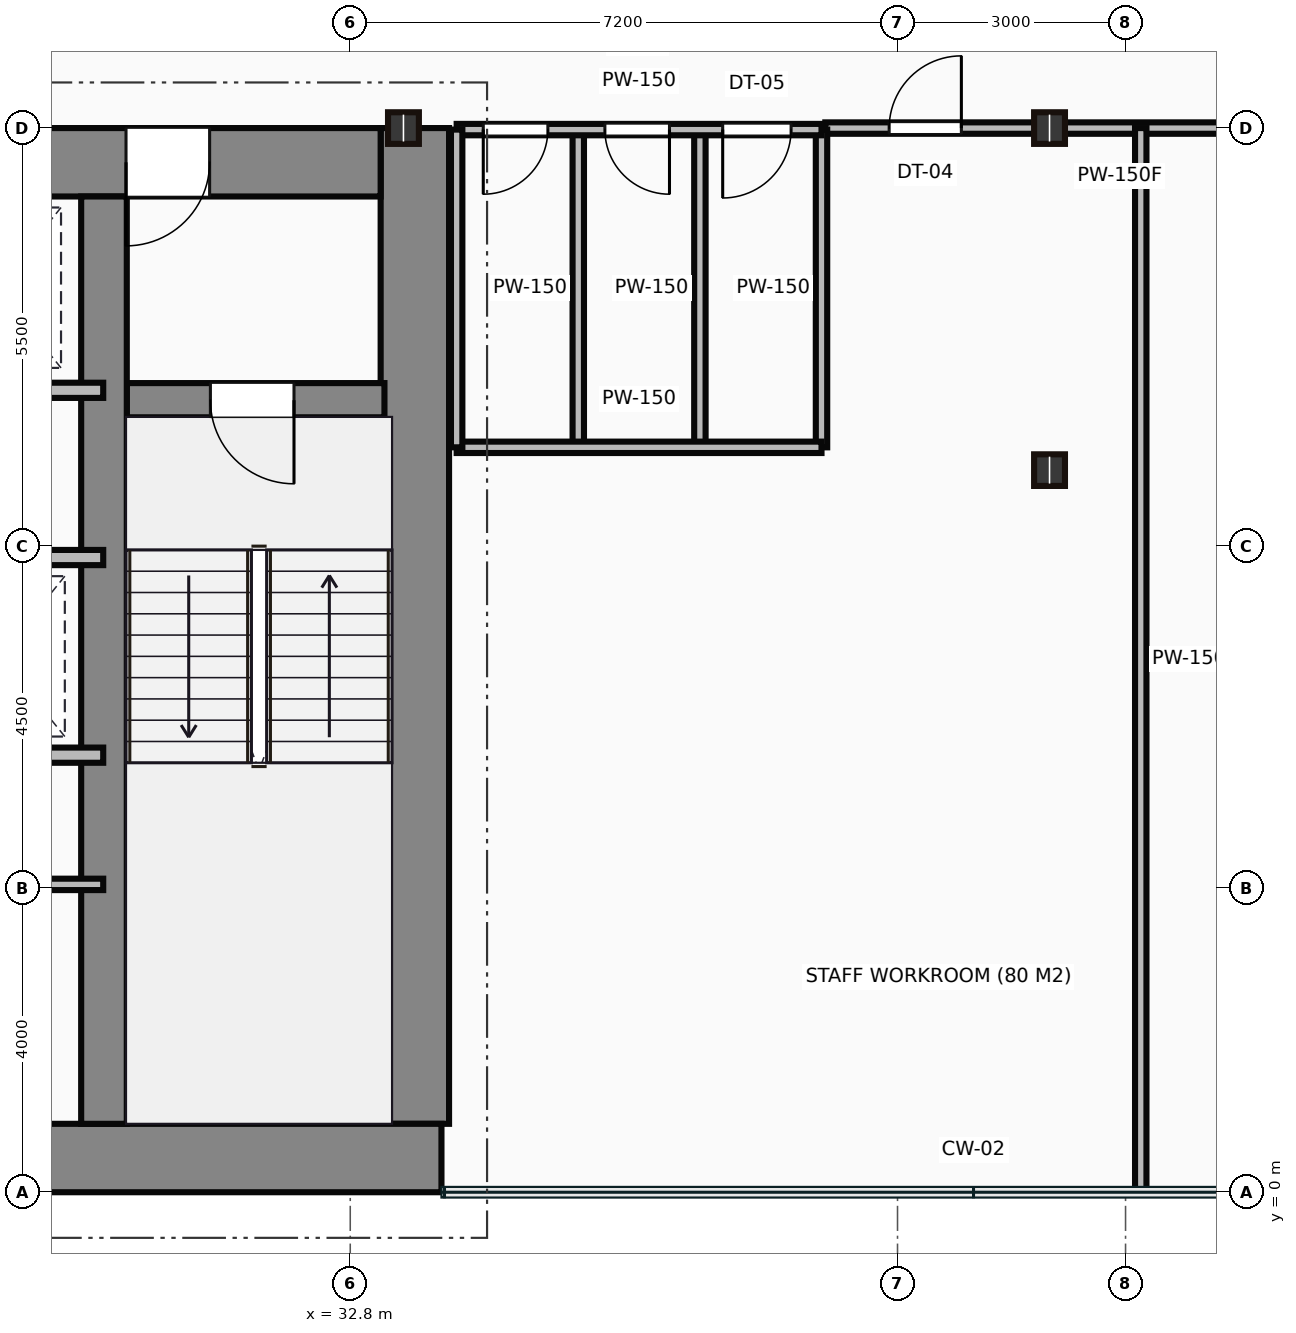
"""IFC4 building model, lengths in metres.
Left out: names, types, materials, properties, quantities, classifications, styles, units other than length and angle.
Written with IfcOpenShell. Run it as: python <this file> out.ifc"""

import sys

from ifc_helpers import new_model, si_unit, direction, frame, frame_2d, origin, origin_2d, place, context, subcontext, project, spatial, rectangle, i_section, extrude, source, transform, mapped, element, fill, save


model = new_model("IFC4")
c1 = context("Model", 3, precision=1e-05, world=origin(), true_north=direction((0.0, 1.0)))
c2 = subcontext(c1, "Body", "Model", "MODEL_VIEW")
j1 = project(units=[si_unit("LENGTHUNIT", "METRE"), si_unit("PLANEANGLEUNIT", "RADIAN")], contexts=[c1])
p1 = place(None, origin())
s1 = spatial("IfcSite", under=j1, at=p1, CompositionType="ELEMENT")
p2 = place(p1, origin())
s2 = spatial("IfcBuilding", under=s1, at=p2, CompositionType="ELEMENT")
p3 = place(p2, frame((0.0, 0.0, 39.8)))
s3 = spatial("IfcBuildingStorey", under=s2, at=p3, CompositionType="ELEMENT", Elevation=39.8)
m1 = source(origin(), c2, "Body", "SweptSolid", [
    extrude(rectangle(XDim=29.5, YDim=0.9, at=frame_2d((14.75, 0.0))), origin(), (0.0, 0.0, 1.0), 3.65),
])
p4 = place(p3, frame((4.5, 0.45, 0.0), z_axis=(0.0, 0.0, 1.0), x_axis=(1.0, 0.0, 0.0)))
e1 = element("IfcWall", 1, at=p4, inside=s3, PredefinedType="SHEAR", context=c2, shape_type="MappedRepresentation", body=[
    mapped(m1, transform((0.0, 0.0, 0.0))),
])
m2 = source(origin(), c2, "Body", "SweptSolid", [
    extrude(rectangle(XDim=13.1, YDim=0.9, at=frame_2d((6.55, 0.0))), origin(), (0.0, 0.0, 1.0), 3.65),
])
p5 = place(p3, frame((33.65, 0.9, 0.0), z_axis=(0.0, 0.0, 1.0), x_axis=(0.0, 1.0, 0.0)))
e2 = element("IfcWall", 2, at=p5, inside=s3, PredefinedType="SHEAR", context=c2, shape_type="MappedRepresentation", body=[
    mapped(m2, transform((0.0, 0.0, 0.0))),
])
m3 = source(origin(), c2, "Body", "SweptSolid", [
    extrude(rectangle(XDim=12.6, YDim=0.9, at=frame_2d((6.3, 0.0))), origin(), (0.0, 0.0, 1.0), 3.65),
])
p6 = place(p3, frame((20.6, 13.55, 0.0), z_axis=(0.0, 0.0, 1.0), x_axis=(1.0, 0.0, 0.0)))
e3 = element("IfcWall", 3, at=p6, inside=s3, PredefinedType="SHEAR", context=c2, shape_type="MappedRepresentation", body=[
    mapped(m3, transform((0.0, 0.0, 0.0))),
])
p7 = place(p6, frame((9.25, 0.0, 0.0)))
e4 = element("IfcOpeningElement", 4, at=p7, cuts=e3, PredefinedType="OPENING", context=c2, shape_type="SweptSolid", body=[
    extrude(rectangle(XDim=1.1, YDim=2.15, at=frame_2d((0.55, 1.075))), frame((0.0, 0.46, 0.0), z_axis=(0.0, -1.0, 0.0), x_axis=(1.0, 0.0, 0.0)), (0.0, 0.0, 1.0), 0.92),
])
m4 = source(origin(), c2, "Body", "SweptSolid", [
    extrude(rectangle(XDim=12.2, YDim=0.6, at=frame_2d((6.1, 0.0))), origin(), (0.0, 0.0, 1.0), 3.65),
])
p8 = place(p3, frame((29.56, 0.9, 0.0), z_axis=(0.0, 0.0, 1.0), x_axis=(0.0, 1.0, 0.0)))
e5 = element("IfcWall", 5, at=p8, inside=s3, PredefinedType="SHEAR", context=c2, shape_type="MappedRepresentation", body=[
    mapped(m4, transform((0.0, 0.0, 0.0))),
])
m5 = source(origin(), c2, "Body", "SweptSolid", [
    extrude(rectangle(XDim=3.39, YDim=0.45, at=frame_2d((1.695, 0.0))), origin(), (0.0, 0.0, 1.0), 3.65),
])
p9 = place(p3, frame((29.86, 10.42, 0.0), z_axis=(0.0, 0.0, 1.0), x_axis=(1.0, 0.0, 0.0)))
e6 = element("IfcWall", 6, at=p9, inside=s3, PredefinedType="SHEAR", context=c2, shape_type="MappedRepresentation", body=[
    mapped(m5, transform((0.0, 0.0, 0.0))),
])
p10 = place(p9, frame((1.1, 0.0, 0.0)))
e7 = element("IfcOpeningElement", 7, at=p10, cuts=e6, PredefinedType="OPENING", context=c2, shape_type="SweptSolid", body=[
    extrude(rectangle(XDim=1.1, YDim=2.15, at=frame_2d((0.55, 1.075))), frame((0.0, 0.235, 0.0), z_axis=(0.0, -1.0, 0.0), x_axis=(1.0, 0.0, 0.0)), (0.0, 0.0, 1.0), 0.47),
])
m6 = source(origin(), c2, "Body", "SweptSolid", [
    extrude(i_section(OverallWidth=0.406, OverallDepth=0.416, WebThickness=0.03, FlangeThickness=0.048, at=origin_2d()), origin(), (0.0, 0.0, 1.0), 3.65),
])
for number, where, z_axis, x_axis in (
    (8, (33.5, 14.0, 0.0), (0.0, 0.0, 1.0), (1.0, 0.0, 0.0)),
    (9, (42.0, 9.5, 0.0), (0.0, 0.0, 1.0), (1.0, 0.0, 0.0)),
    (10, (42.0, 14.0, 0.0), (0.0, 0.0, 1.0), (1.0, 0.0, 0.0)),
):
    element("IfcColumn", number, at=place(p3, frame(where, z_axis=z_axis, x_axis=x_axis)), inside=s3, PredefinedType="COLUMN", context=c2, shape_type="MappedRepresentation", body=[
        mapped(m6, transform((0.0, 0.0, 0.0))),
    ])
m7 = source(origin(), c2, "Body", "SweptSolid", [
    extrude(rectangle(XDim=8.8, YDim=0.2, at=frame_2d((4.4, 0.0))), origin(), (0.0, 0.0, 1.0), 3.4),
])
p11 = place(p3, frame((20.75, 10.55, 0.0), z_axis=(0.0, 0.0, 1.0), x_axis=(1.0, 0.0, 0.0)))
e11 = element("IfcWall", 11, at=p11, inside=s3, PredefinedType="PARTITIONING", context=c2, shape_type="MappedRepresentation", body=[
    mapped(m7, transform((0.0, 0.0, 0.0))),
])
m8 = source(origin(), c2, "Body", "SweptSolid", [
    extrude(rectangle(XDim=4.55, YDim=0.2, at=frame_2d((2.275, 0.0))), origin(), (0.0, 0.0, 1.0), 3.4),
])
for number, where, z_axis, x_axis in (
    (12, (25.0, 8.35, 0.0), (0.0, 0.0, 1.0), (1.0, 0.0, 0.0)),
    (13, (25.0, 5.75, 0.0), (0.0, 0.0, 1.0), (1.0, 0.0, 0.0)),
):
    element("IfcWall", number, at=place(p3, frame(where, z_axis=z_axis, x_axis=x_axis)), inside=s3, PredefinedType="PARTITIONING", context=c2, shape_type="MappedRepresentation", body=[
        mapped(m8, transform((0.0, 0.0, 0.0))),
    ])
m9 = source(origin(), c2, "Body", "SweptSolid", [
    extrude(rectangle(XDim=4.55, YDim=0.15, at=frame_2d((2.275, 0.0))), origin(), (0.0, 0.0, 1.0), 3.4),
])
p12 = place(p3, frame((25.0, 4.05, 0.0), z_axis=(0.0, 0.0, 1.0), x_axis=(1.0, 0.0, 0.0)))
e14 = element("IfcWall", 14, at=p12, inside=s3, PredefinedType="PARTITIONING", context=c2, shape_type="MappedRepresentation", body=[
    mapped(m9, transform((0.0, 0.0, 0.0))),
])
m10 = source(origin(), c2, "Body", "SweptSolid", [
    extrude(rectangle(XDim=4.8, YDim=0.15, at=frame_2d((2.4, 0.0))), origin(), (0.0, 0.0, 1.0), 2.625),
])
p13 = place(p3, frame((34.2, 13.98, 0.0), z_axis=(0.0, 0.0, 1.0), x_axis=(1.0, 0.0, 0.0)))
e15 = element("IfcWall", 15, at=p13, inside=s3, PredefinedType="PARTITIONING", context=c2, shape_type="MappedRepresentation", body=[
    mapped(m10, transform((0.0, 0.0, 0.0))),
])
p14 = place(p13, frame((0.35, 0.0, 0.0)))
e16 = element("IfcOpeningElement", 16, at=p14, cuts=e15, PredefinedType="OPENING", context=c2, shape_type="SweptSolid", body=[
    extrude(rectangle(XDim=0.85, YDim=2.1, at=frame_2d((0.425, 1.05))), frame((0.0, 0.085, 0.0), z_axis=(0.0, -1.0, 0.0), x_axis=(1.0, 0.0, 0.0)), (0.0, 0.0, 1.0), 0.17),
])
p15 = place(p13, frame((1.95, 0.0, 0.0)))
e17 = element("IfcOpeningElement", 17, at=p15, cuts=e15, PredefinedType="OPENING", context=c2, shape_type="SweptSolid", body=[
    extrude(rectangle(XDim=0.85, YDim=2.1, at=frame_2d((0.425, 1.05))), frame((0.0, 0.085, 0.0), z_axis=(0.0, -1.0, 0.0), x_axis=(1.0, 0.0, 0.0)), (0.0, 0.0, 1.0), 0.17),
])
p16 = place(p13, frame((3.5, 0.0, 0.0)))
e18 = element("IfcOpeningElement", 18, at=p16, cuts=e15, PredefinedType="OPENING", context=c2, shape_type="SweptSolid", body=[
    extrude(rectangle(XDim=0.9, YDim=2.1, at=frame_2d((0.45, 1.05))), frame((0.0, 0.085, 0.0), z_axis=(0.0, -1.0, 0.0), x_axis=(1.0, 0.0, 0.0)), (0.0, 0.0, 1.0), 0.17),
])
m11 = source(origin(), c2, "Body", "SweptSolid", [
    extrude(rectangle(XDim=4.8, YDim=0.15, at=frame_2d((2.4, 0.0))), origin(), (0.0, 0.0, 1.0), 3.4),
])
p17 = place(p3, frame((34.2, 9.8, 0.0), z_axis=(0.0, 0.0, 1.0), x_axis=(1.0, 0.0, 0.0)))
e19 = element("IfcWall", 19, at=p17, inside=s3, PredefinedType="PARTITIONING", context=c2, shape_type="MappedRepresentation", body=[
    mapped(m11, transform((0.0, 0.0, 0.0))),
])
m12 = source(origin(), c2, "Body", "SweptSolid", [
    extrude(rectangle(XDim=4.18, YDim=0.15, at=frame_2d((2.09, 0.0))), origin(), (0.0, 0.0, 1.0), 3.4),
])
for number, where, z_axis, x_axis in (
    (20, (39.0, 9.8, 0.0), (0.0, 0.0, 1.0), (0.0, 1.0, 0.0)),
    (21, (34.2, 9.8, 0.0), (0.0, 0.0, 1.0), (0.0, 1.0, 0.0)),
    (22, (35.8, 9.8, 0.0), (0.0, 0.0, 1.0), (0.0, 1.0, 0.0)),
    (23, (37.4, 9.8, 0.0), (0.0, 0.0, 1.0), (0.0, 1.0, 0.0)),
):
    element("IfcWall", number, at=place(p3, frame(where, z_axis=z_axis, x_axis=x_axis)), inside=s3, PredefinedType="PARTITIONING", context=c2, shape_type="MappedRepresentation", body=[
        mapped(m12, transform((0.0, 0.0, 0.0))),
    ])
m13 = source(origin(), c2, "Body", "SweptSolid", [
    extrude(rectangle(XDim=7.75, YDim=0.15, at=frame_2d((3.875, 0.0))), origin(), (0.0, 0.0, 1.0), 2.625),
])
p18 = place(p3, frame((46.8, 14.0, 0.0), z_axis=(0.0, 0.0, 1.0), x_axis=(-1.0, 0.0, 0.0)))
e24 = element("IfcWall", 24, at=p18, inside=s3, PredefinedType="PARTITIONING", context=c2, shape_type="MappedRepresentation", body=[
    mapped(m13, transform((0.0, 0.0, 0.0))),
])
p19 = place(p18, frame((5.96, 0.0, 0.0)))
e25 = element("IfcOpeningElement", 25, at=p19, cuts=e24, PredefinedType="OPENING", context=c2, shape_type="SweptSolid", body=[
    extrude(rectangle(XDim=0.95, YDim=2.15, at=frame_2d((0.475, 1.075))), frame((0.0, 0.085, 0.0), z_axis=(0.0, -1.0, 0.0), x_axis=(1.0, 0.0, 0.0)), (0.0, 0.0, 1.0), 0.17),
])
p20 = place(p18, frame((1.455, 0.0, 0.0)))
e26 = element("IfcOpeningElement", 26, at=p20, cuts=e24, PredefinedType="OPENING", context=c2, shape_type="SweptSolid", body=[
    extrude(rectangle(XDim=0.95, YDim=2.15, at=frame_2d((0.475, 1.075))), frame((0.0, 0.085, 0.0), z_axis=(0.0, -1.0, 0.0), x_axis=(1.0, 0.0, 0.0)), (0.0, 0.0, 1.0), 0.17),
])
m14 = source(origin(), c2, "Body", "SweptSolid", [
    extrude(rectangle(XDim=13.98, YDim=0.15, at=frame_2d((6.99, 0.0))), origin(), (0.0, 0.0, 1.0), 3.4),
])
p21 = place(p3, frame((43.2, 14.0, 0.0), z_axis=(0.0, 0.0, 1.0), x_axis=(0.0, -1.0, 0.0)))
e27 = element("IfcWall", 27, at=p21, inside=s3, PredefinedType="PARTITIONING", context=c2, shape_type="MappedRepresentation", body=[
    mapped(m14, transform((0.0, 0.0, 0.0))),
])
m15 = source(origin(), c2, "Body", "SweptSolid", [
    extrude(rectangle(XDim=1.1, YDim=2.15, at=frame_2d((0.55, 1.075))), frame((0.0, 0.025, 0.0), z_axis=(0.0, -1.0, 0.0), x_axis=(1.0, 0.0, 0.0)), (0.0, 0.0, 1.0), 0.05),
])
p22 = place(p10, frame((1.1, 0.0, 0.0), z_axis=(0.0, 0.0, 1.0), x_axis=(-1.0, 0.0, 0.0)))
e28 = element("IfcDoor", 28, at=p22, inside=s3, OperationType="SINGLE_SWING_RIGHT", PredefinedType="DOOR", context=c2, shape_type="MappedRepresentation", body=[
    mapped(m15, transform((0.0, 0.0, 0.0))),
])
fill(e7, e28)
p23 = place(p7, origin())
e29 = element("IfcDoor", 29, at=p23, inside=s3, OperationType="SINGLE_SWING_LEFT", PredefinedType="DOOR", context=c2, shape_type="MappedRepresentation", body=[
    mapped(m15, transform((0.0, 0.0, 0.0))),
])
fill(e4, e29)
m16 = source(origin(), c2, "Body", "SweptSolid", [
    extrude(rectangle(XDim=0.85, YDim=2.1, at=frame_2d((0.425, 1.05))), frame((0.0, 0.025, 0.0), z_axis=(0.0, -1.0, 0.0), x_axis=(1.0, 0.0, 0.0)), (0.0, 0.0, 1.0), 0.05),
])
p24 = place(p14, frame((0.85, 0.0, 0.0), z_axis=(0.0, 0.0, 1.0), x_axis=(-1.0, 0.0, 0.0)))
e30 = element("IfcDoor", 30, at=p24, inside=s3, OperationType="SINGLE_SWING_LEFT", PredefinedType="DOOR", context=c2, shape_type="MappedRepresentation", body=[
    mapped(m16, transform((0.0, 0.0, 0.0))),
])
fill(e16, e30)
p25 = place(p15, frame((0.85, 0.0, 0.0), z_axis=(0.0, 0.0, 1.0), x_axis=(-1.0, 0.0, 0.0)))
e31 = element("IfcDoor", 31, at=p25, inside=s3, OperationType="SINGLE_SWING_RIGHT", PredefinedType="DOOR", context=c2, shape_type="MappedRepresentation", body=[
    mapped(m16, transform((0.0, 0.0, 0.0))),
])
fill(e17, e31)
m17 = source(origin(), c2, "Body", "SweptSolid", [
    extrude(rectangle(XDim=0.9, YDim=2.1, at=frame_2d((0.45, 1.05))), frame((0.0, 0.025, 0.0), z_axis=(0.0, -1.0, 0.0), x_axis=(1.0, 0.0, 0.0)), (0.0, 0.0, 1.0), 0.05),
])
p26 = place(p16, frame((0.9, 0.0, 0.0), z_axis=(0.0, 0.0, 1.0), x_axis=(-1.0, 0.0, 0.0)))
e32 = element("IfcDoor", 32, at=p26, inside=s3, OperationType="SINGLE_SWING_LEFT", PredefinedType="DOOR", context=c2, shape_type="MappedRepresentation", body=[
    mapped(m17, transform((0.0, 0.0, 0.0))),
])
fill(e18, e32)
m18 = source(origin(), c2, "Body", "SweptSolid", [
    extrude(rectangle(XDim=0.95, YDim=2.15, at=frame_2d((0.475, 1.075))), frame((0.0, 0.025, 0.0), z_axis=(0.0, -1.0, 0.0), x_axis=(1.0, 0.0, 0.0)), (0.0, 0.0, 1.0), 0.05),
])
p27 = place(p19, origin())
e33 = element("IfcDoor", 33, at=p27, inside=s3, OperationType="SINGLE_SWING_LEFT", PredefinedType="DOOR", context=c2, shape_type="MappedRepresentation", body=[
    mapped(m18, transform((0.0, 0.0, 0.0))),
])
fill(e25, e33)
save(model, sys.argv[1])
